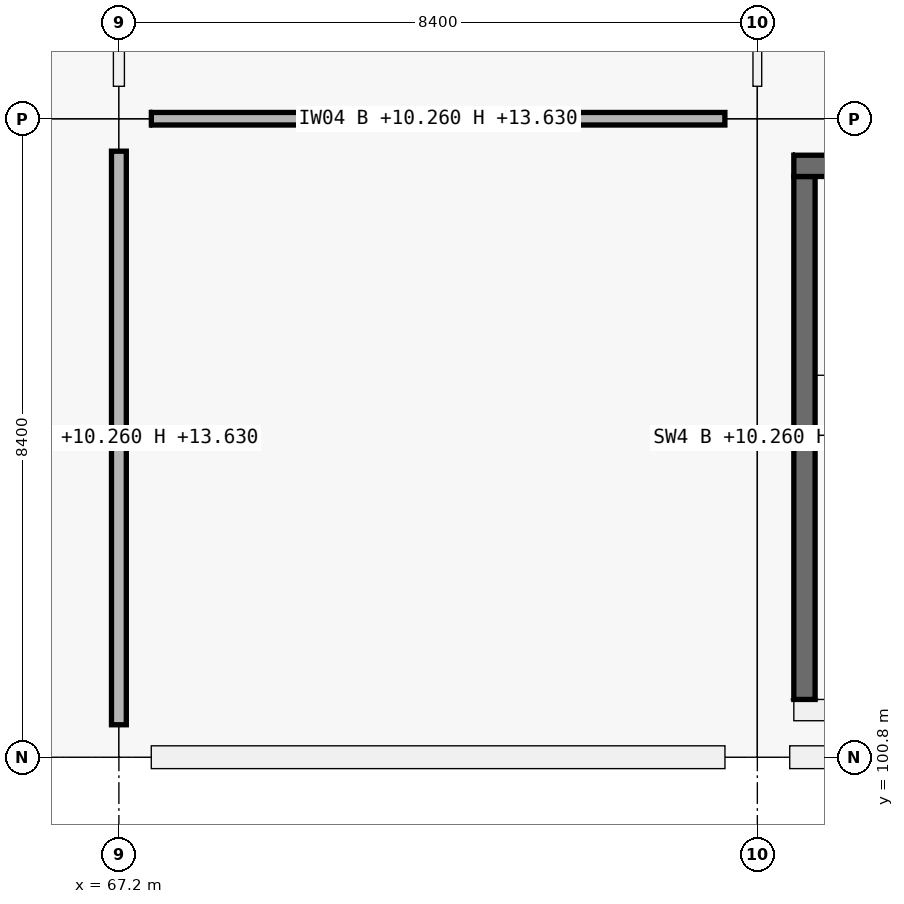
"""IFC4 building model, lengths in metres.
Left out: names, types, materials, properties, quantities, classifications, styles, units other than length and angle.
Written with IfcOpenShell. Run it as: python <this file> out.ifc"""

import sys

from ifc_helpers import new_model, si_unit, direction, frame, frame_2d, origin, origin_2d, place, context, subcontext, project, spatial, rectangle, extrude, element, fill, save


model = new_model("IFC4")
c1 = context("Model", 3, precision=1e-05, world=origin(), true_north=direction((0.0, 1.0)))
c2 = subcontext(c1, "Body", "Model", "MODEL_VIEW")
j1 = project(units=[si_unit("LENGTHUNIT", "METRE"), si_unit("PLANEANGLEUNIT", "RADIAN")], contexts=[c1])
p1 = place(None, origin())
s1 = spatial("IfcSite", under=j1, at=p1, CompositionType="ELEMENT")
p2 = place(p1, origin())
s2 = spatial("IfcBuilding", under=s1, at=p2, CompositionType="ELEMENT")
p3 = place(p2, frame((0.0, 0.0, 10.26)))
s3 = spatial("IfcBuildingStorey", under=s2, at=p3, CompositionType="ELEMENT", Elevation=10.26)
for number, where, z_axis, x_axis in (
    (1, (67.2, 100.8, 0.0), (0.0, 0.0, 1.0), (1.0, 0.0, 0.0)),
    (2, (67.2, 109.2, 0.0), (0.0, 0.0, 1.0), (1.0, 0.0, 0.0)),
    (3, (75.6, 100.8, 0.0), (0.0, 0.0, 1.0), (1.0, 0.0, 0.0)),
    (4, (75.6, 109.2, 0.0), (0.0, 0.0, 1.0), (1.0, 0.0, 0.0)),
):
    element("IfcColumn", number, at=place(p3, frame(where, z_axis=z_axis, x_axis=x_axis)), inside=s3, PredefinedType="COLUMN", context=c2, shape_type="SweptSolid", body=[
        extrude(rectangle(XDim=0.85, YDim=0.85, at=origin_2d()), origin(), (0.0, 0.0, 1.0), 4.5),
    ])
for number, where, z_axis, x_axis in (
    (5, (75.174, 100.8, 0.0), (0.0, 0.0, 1.0), (-1.0, 0.0, 0.0)),
    (6, (83.574, 100.8, 0.0), (0.0, 0.0, 1.0), (-1.0, 0.0, 0.0)),
):
    element("IfcWall", number, at=place(p3, frame(where, z_axis=z_axis, x_axis=x_axis)), inside=s3, PredefinedType="SOLIDWALL", context=c2, shape_type="SweptSolid", body=[
        extrude(rectangle(XDim=7.548, YDim=0.3, at=frame_2d((3.774, 0.0))), origin(), (0.0, 0.0, 1.0), 3.54),
    ])
p4 = place(p3, frame((83.52, 101.42, 0.0), z_axis=(0.0, 0.0, 1.0), x_axis=(-1.0, 0.0, 0.0)))
e7 = element("IfcWall", 7, at=p4, inside=s3, PredefinedType="SHEAR", context=c2, shape_type="SweptSolid", body=[
    extrude(rectangle(XDim=7.44, YDim=0.28, at=frame_2d((3.72, 0.0))), origin(), (0.0, 0.0, 1.0), 4.5),
])
p5 = place(p3, frame((76.22, 101.56, 0.0), z_axis=(0.0, 0.0, 1.0), x_axis=(0.0, 1.0, 0.0)))
e8 = element("IfcWall", 8, at=p5, inside=s3, PredefinedType="SHEAR", context=c2, shape_type="SweptSolid", body=[
    extrude(rectangle(XDim=6.88, YDim=0.28, at=frame_2d((3.44, 0.0))), origin(), (0.0, 0.0, 1.0), 4.5),
])
p6 = place(p3, frame((76.08, 108.58, 0.0), z_axis=(0.0, 0.0, 1.0), x_axis=(1.0, 0.0, 0.0)))
e9 = element("IfcWall", 9, at=p6, inside=s3, PredefinedType="SHEAR", context=c2, shape_type="SweptSolid", body=[
    extrude(rectangle(XDim=7.44, YDim=0.28, at=frame_2d((3.72, 0.0))), origin(), (0.0, 0.0, 1.0), 4.5),
])
p7 = place(p3, frame((67.627, 109.2, 0.0), z_axis=(0.0, 0.0, 1.0), x_axis=(1.0, 0.0, 0.0)))
e10 = element("IfcWall", 10, at=p7, inside=s3, PredefinedType="PARTITIONING", context=c2, shape_type="SweptSolid", body=[
    extrude(rectangle(XDim=7.546, YDim=0.165, at=frame_2d((3.773, 0.0))), origin(), (0.0, 0.0, 1.0), 3.37),
])
p8 = place(p3, frame((67.2, 101.227, 0.0), z_axis=(0.0, 0.0, 1.0), x_axis=(0.0, 1.0, 0.0)))
e11 = element("IfcWall", 11, at=p8, inside=s3, PredefinedType="PARTITIONING", context=c2, shape_type="SweptSolid", body=[
    extrude(rectangle(XDim=7.546, YDim=0.195, at=frame_2d((3.773, 0.0))), origin(), (0.0, 0.0, 1.0), 3.37),
])
p9 = place(p8, frame((3.273, 0.0, 0.0)))
e12 = element("IfcOpeningElement", 12, at=p9, cuts=e11, PredefinedType="OPENING", context=c2, shape_type="SweptSolid", body=[
    extrude(rectangle(XDim=1.0, YDim=2.2, at=frame_2d((0.5, 1.1))), frame((0.0, 0.098, 0.0), z_axis=(0.0, -1.0, 0.0), x_axis=(1.0, 0.0, 0.0)), (0.0, 0.0, 1.0), 0.195),
])
p10 = place(p3, frame((67.2, 109.627, 0.0), z_axis=(0.0, 0.0, 1.0), x_axis=(0.0, 1.0, 0.0)))
e13 = element("IfcWall", 13, at=p10, inside=s3, PredefinedType="PARTITIONING", context=c2, shape_type="SweptSolid", body=[
    extrude(rectangle(XDim=7.696, YDim=0.145, at=frame_2d((3.848, 0.0))), origin(), (0.0, 0.0, 1.0), 3.37),
])
p11 = place(p10, frame((0.558, 0.0, 0.0)))
e14 = element("IfcOpeningElement", 14, at=p11, cuts=e13, PredefinedType="OPENING", context=c2, shape_type="SweptSolid", body=[
    extrude(rectangle(XDim=0.96, YDim=2.1, at=frame_2d((0.48, 1.05))), frame((0.0, 0.073, 0.0), z_axis=(0.0, -1.0, 0.0), x_axis=(1.0, 0.0, 0.0)), (0.0, 0.0, 1.0), 0.145),
])
p12 = place(p10, frame((4.498, 0.0, 0.0)))
e15 = element("IfcOpeningElement", 15, at=p12, cuts=e13, PredefinedType="OPENING", context=c2, shape_type="SweptSolid", body=[
    extrude(rectangle(XDim=0.92, YDim=2.1, at=frame_2d((0.46, 1.05))), frame((0.0, 0.073, 0.0), z_axis=(0.0, -1.0, 0.0), x_axis=(1.0, 0.0, 0.0)), (0.0, 0.0, 1.0), 0.145),
])
p13 = place(p3, frame((75.6, 109.627, 0.0), z_axis=(0.0, 0.0, 1.0), x_axis=(0.0, 1.0, 0.0)))
e16 = element("IfcWall", 16, at=p13, inside=s3, PredefinedType="PARTITIONING", context=c2, shape_type="SweptSolid", body=[
    extrude(rectangle(XDim=7.696, YDim=0.115, at=frame_2d((3.848, 0.0))), origin(), (0.0, 0.0, 1.0), 3.37),
])
p14 = place(p9, origin())
e17 = element("IfcDoor", 17, at=p14, inside=s3, OperationType="SINGLE_SWING_LEFT", PredefinedType="DOOR", context=c2, shape_type="SweptSolid", body=[
    extrude(rectangle(XDim=1.0, YDim=2.2, at=frame_2d((0.5, 1.1))), frame((0.0, 0.025, 0.0), z_axis=(0.0, -1.0, 0.0), x_axis=(1.0, 0.0, 0.0)), (0.0, 0.0, 1.0), 0.05),
])
fill(e12, e17)
save(model, sys.argv[1])
